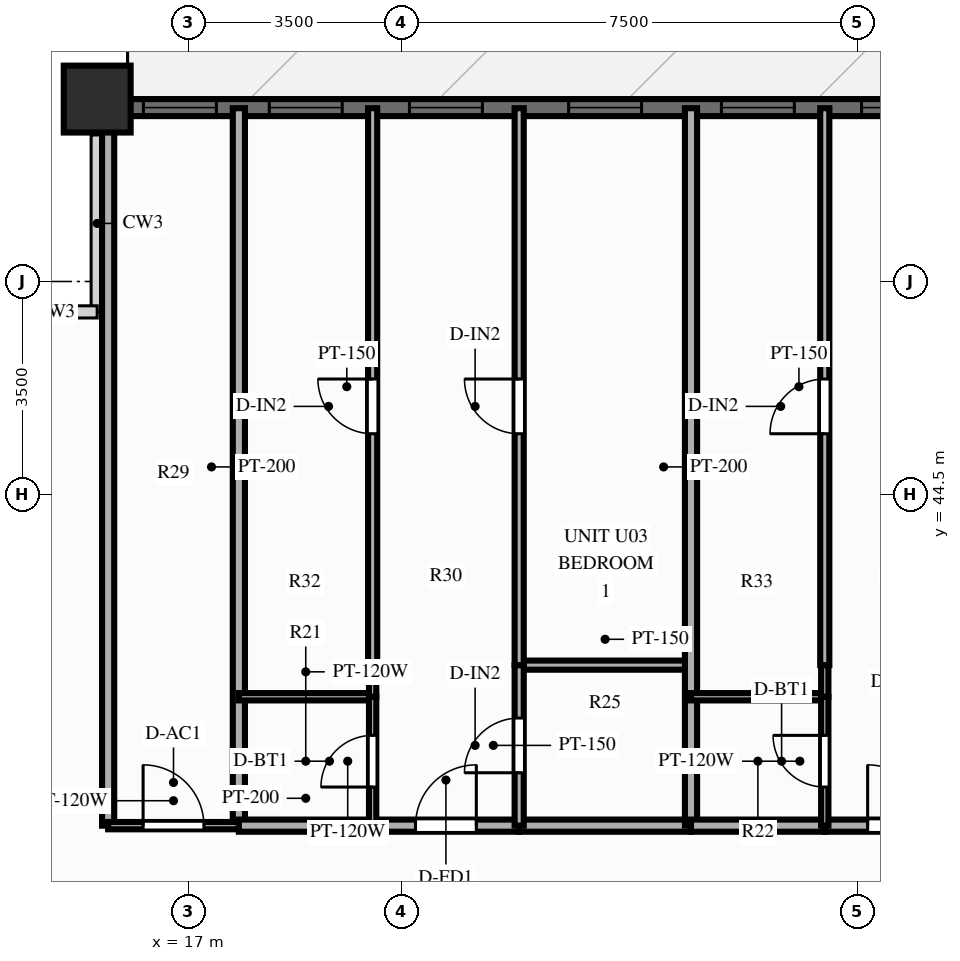
"""IFC4 building model, lengths in metres.
Left out: names, types, materials, properties, quantities, classifications, styles, units other than length and angle.
Written with IfcOpenShell. Run it as: python <this file> out.ifc"""

import sys

from ifc_helpers import new_model, si_unit, direction, frame, frame_2d, origin, origin_2d, place, context, subcontext, project, spatial, rectangle, extrude, source, transform, mapped, element, fill, save


model = new_model("IFC4")
c1 = context("Model", 3, precision=1e-05, world=origin(), true_north=direction((0.0, 1.0)))
c2 = subcontext(c1, "Body", "Model", "MODEL_VIEW")
j1 = project(units=[si_unit("LENGTHUNIT", "METRE"), si_unit("PLANEANGLEUNIT", "RADIAN")], contexts=[c1])
p1 = place(None, origin())
s1 = spatial("IfcSite", under=j1, at=p1, CompositionType="ELEMENT")
p2 = place(p1, origin())
s2 = spatial("IfcBuilding", under=s1, at=p2, CompositionType="ELEMENT")
p3 = place(p2, frame((0.0, 0.0, 52.4)))
s3 = spatial("IfcBuildingStorey", under=s2, at=p3, CompositionType="ELEMENT", Elevation=52.4)
m1 = source(origin(), c2, "Body", "SweptSolid", [
    extrude(rectangle(XDim=1.1, YDim=1.1, at=origin_2d()), origin(), (0.0, 0.0, 1.0), 3.0),
])
p4 = place(p3, frame((15.5, 51.0, 0.0), z_axis=(0.0, 0.0, 1.0), x_axis=(1.0, 0.0, 0.0)))
e1 = element("IfcColumn", 1, at=p4, inside=s3, PredefinedType="COLUMN", context=c2, shape_type="MappedRepresentation", body=[
    mapped(m1, transform((0.0, 0.0, 0.0), scale=1.0)),
])
p5 = place(p3, frame((15.5, 50.86, 0.0), z_axis=(0.0, 0.0, 1.0), x_axis=(1.0, 0.0, 0.0)))
e2 = element("IfcWall", 2, at=p5, inside=s3, PredefinedType="SOLIDWALL", context=c2, shape_type="SweptSolid", body=[
    extrude(rectangle(XDim=45.0, YDim=0.28, at=frame_2d((22.5, 0.0))), origin(), (0.0, 0.0, 1.0), 2.28),
])
p6 = place(p5, frame((0.76, 0.0, 0.25)))
e3 = element("IfcOpeningElement", 3, at=p6, cuts=e2, PredefinedType="OPENING", context=c2, shape_type="SweptSolid", body=[
    extrude(rectangle(XDim=1.2, YDim=1.5, at=frame_2d((0.6, 0.75))), frame((0.0, 0.152, 0.0), z_axis=(0.0, -1.0, 0.0), x_axis=(1.0, 0.0, 0.0)), (0.0, 0.0, 1.0), 0.304),
])
p7 = place(p5, frame((2.83, 0.0, 0.25)))
e4 = element("IfcOpeningElement", 4, at=p7, cuts=e2, PredefinedType="OPENING", context=c2, shape_type="SweptSolid", body=[
    extrude(rectangle(XDim=1.2, YDim=1.5, at=frame_2d((0.6, 0.75))), frame((0.0, 0.152, 0.0), z_axis=(0.0, -1.0, 0.0), x_axis=(1.0, 0.0, 0.0)), (0.0, 0.0, 1.0), 0.304),
])
p8 = place(p5, frame((5.135, 0.0, 0.25)))
e5 = element("IfcOpeningElement", 5, at=p8, cuts=e2, PredefinedType="OPENING", context=c2, shape_type="SweptSolid", body=[
    extrude(rectangle(XDim=1.2, YDim=1.5, at=frame_2d((0.6, 0.75))), frame((0.0, 0.152, 0.0), z_axis=(0.0, -1.0, 0.0), x_axis=(1.0, 0.0, 0.0)), (0.0, 0.0, 1.0), 0.304),
])
p9 = place(p5, frame((7.753, 0.0, 0.25)))
e6 = element("IfcOpeningElement", 6, at=p9, cuts=e2, PredefinedType="OPENING", context=c2, shape_type="SweptSolid", body=[
    extrude(rectangle(XDim=1.2, YDim=1.5, at=frame_2d((0.6, 0.75))), frame((0.0, 0.152, 0.0), z_axis=(0.0, -1.0, 0.0), x_axis=(1.0, 0.0, 0.0)), (0.0, 0.0, 1.0), 0.304),
])
p10 = place(p5, frame((10.266, 0.0, 0.25)))
e7 = element("IfcOpeningElement", 7, at=p10, cuts=e2, PredefinedType="OPENING", context=c2, shape_type="SweptSolid", body=[
    extrude(rectangle(XDim=1.2, YDim=1.5, at=frame_2d((0.6, 0.75))), frame((0.0, 0.152, 0.0), z_axis=(0.0, -1.0, 0.0), x_axis=(1.0, 0.0, 0.0)), (0.0, 0.0, 1.0), 0.304),
])
p11 = place(p5, frame((12.571, 0.0, 0.25)))
e8 = element("IfcOpeningElement", 8, at=p11, cuts=e2, PredefinedType="OPENING", context=c2, shape_type="SweptSolid", body=[
    extrude(rectangle(XDim=1.2, YDim=1.5, at=frame_2d((0.6, 0.75))), frame((0.0, 0.152, 0.0), z_axis=(0.0, -1.0, 0.0), x_axis=(1.0, 0.0, 0.0)), (0.0, 0.0, 1.0), 0.304),
])
p12 = place(p5, frame((14.643, 0.0, 0.25)))
e9 = element("IfcOpeningElement", 9, at=p12, cuts=e2, PredefinedType="OPENING", context=c2, shape_type="SweptSolid", body=[
    extrude(rectangle(XDim=0.7, YDim=1.5, at=frame_2d((0.35, 0.75))), frame((0.0, 0.152, 0.0), z_axis=(0.0, -1.0, 0.0), x_axis=(1.0, 0.0, 0.0)), (0.0, 0.0, 1.0), 0.304),
])
p13 = place(p5, frame((17.977, 0.0, 0.25)))
e10 = element("IfcOpeningElement", 10, at=p13, cuts=e2, PredefinedType="OPENING", context=c2, shape_type="SweptSolid", body=[
    extrude(rectangle(XDim=1.2, YDim=1.5, at=frame_2d((0.6, 0.75))), frame((0.0, 0.152, 0.0), z_axis=(0.0, -1.0, 0.0), x_axis=(1.0, 0.0, 0.0)), (0.0, 0.0, 1.0), 0.304),
])
p14 = place(p5, frame((23.263, 0.0, 0.0)))
e11 = element("IfcOpeningElement", 11, at=p14, cuts=e2, PredefinedType="OPENING", context=c2, shape_type="SweptSolid", body=[
    extrude(rectangle(XDim=1.1, YDim=2.15, at=frame_2d((0.55, 1.075))), frame((0.0, 0.152, 0.0), z_axis=(0.0, -1.0, 0.0), x_axis=(1.0, 0.0, 0.0)), (0.0, 0.0, 1.0), 0.304),
])
p15 = place(p5, frame((29.832, 0.0, 0.25)))
e12 = element("IfcOpeningElement", 12, at=p15, cuts=e2, PredefinedType="OPENING", context=c2, shape_type="SweptSolid", body=[
    extrude(rectangle(XDim=0.95, YDim=1.5, at=frame_2d((0.475, 0.75))), frame((0.0, 0.152, 0.0), z_axis=(0.0, -1.0, 0.0), x_axis=(1.0, 0.0, 0.0)), (0.0, 0.0, 1.0), 0.304),
])
p16 = place(p5, frame((31.998, 0.0, 0.25)))
e13 = element("IfcOpeningElement", 13, at=p16, cuts=e2, PredefinedType="OPENING", context=c2, shape_type="SweptSolid", body=[
    extrude(rectangle(XDim=1.2, YDim=1.5, at=frame_2d((0.6, 0.75))), frame((0.0, 0.152, 0.0), z_axis=(0.0, -1.0, 0.0), x_axis=(1.0, 0.0, 0.0)), (0.0, 0.0, 1.0), 0.304),
])
p17 = place(p5, frame((37.023, 0.0, 0.25)))
e14 = element("IfcOpeningElement", 14, at=p17, cuts=e2, PredefinedType="OPENING", context=c2, shape_type="SweptSolid", body=[
    extrude(rectangle(XDim=1.2, YDim=1.5, at=frame_2d((0.6, 0.75))), frame((0.0, 0.152, 0.0), z_axis=(0.0, -1.0, 0.0), x_axis=(1.0, 0.0, 0.0)), (0.0, 0.0, 1.0), 0.304),
])
p18 = place(p5, frame((42.341, 0.0, 0.25)))
e15 = element("IfcOpeningElement", 15, at=p18, cuts=e2, PredefinedType="OPENING", context=c2, shape_type="SweptSolid", body=[
    extrude(rectangle(XDim=1.2, YDim=1.5, at=frame_2d((0.6, 0.75))), frame((0.0, 0.152, 0.0), z_axis=(0.0, -1.0, 0.0), x_axis=(1.0, 0.0, 0.0)), (0.0, 0.0, 1.0), 0.304),
])
for number, where, z_axis, x_axis in (
    (16, (15.68, 39.05, 0.0), (0.0, 0.0, 1.0), (0.0, 1.0, 0.0)),
    (17, (17.83, 39.05, 0.0), (0.0, 0.0, 1.0), (0.0, 1.0, 0.0)),
):
    element("IfcWall", number, at=place(p3, frame(where, z_axis=z_axis, x_axis=x_axis)), inside=s3, PredefinedType="PARTITIONING", context=c2, shape_type="SweptSolid", body=[
        extrude(rectangle(XDim=11.8, YDim=0.2, at=frame_2d((5.9, 0.0))), origin(), (0.0, 0.0, 1.0), 2.79),
    ])
p19 = place(p3, frame((15.68, 39.05, 0.0), z_axis=(0.0, 0.0, 1.0), x_axis=(1.0, 0.0, 0.0)))
e18 = element("IfcWall", 18, at=p19, inside=s3, PredefinedType="PARTITIONING", context=c2, shape_type="SweptSolid", body=[
    extrude(rectangle(XDim=2.15, YDim=0.12, at=frame_2d((1.075, 0.0))), origin(), (0.0, 0.0, 1.0), 2.79),
])
p20 = place(p19, frame((0.575, 0.0, 0.0)))
e19 = element("IfcOpeningElement", 19, at=p20, cuts=e18, PredefinedType="OPENING", context=c2, shape_type="SweptSolid", body=[
    extrude(rectangle(XDim=1.0, YDim=2.1, at=frame_2d((0.5, 1.05))), frame((0.0, 0.072, 0.0), z_axis=(0.0, -1.0, 0.0), x_axis=(1.0, 0.0, 0.0)), (0.0, 0.0, 1.0), 0.144),
])
p21 = place(p3, frame((17.83, 39.05, 0.0), z_axis=(0.0, 0.0, 1.0), x_axis=(1.0, 0.0, 0.0)))
e20 = element("IfcWall", 20, at=p21, inside=s3, PredefinedType="PARTITIONING", context=c2, shape_type="SweptSolid", body=[
    extrude(rectangle(XDim=2.2, YDim=0.2, at=frame_2d((1.1, 0.0))), origin(), (0.0, 0.0, 1.0), 2.79),
])
p22 = place(p3, frame((20.03, 39.05, 0.0), z_axis=(0.0, 0.0, 1.0), x_axis=(1.0, 0.0, 0.0)))
e21 = element("IfcWall", 21, at=p22, inside=s3, PredefinedType="PARTITIONING", context=c2, shape_type="SweptSolid", body=[
    extrude(rectangle(XDim=2.41, YDim=0.2, at=frame_2d((1.205, 0.0))), origin(), (0.0, 0.0, 1.0), 2.79),
])
p23 = place(p22, frame((0.705, 0.0, 0.0)))
e22 = element("IfcOpeningElement", 22, at=p23, cuts=e21, PredefinedType="OPENING", context=c2, shape_type="SweptSolid", body=[
    extrude(rectangle(XDim=1.0, YDim=2.15, at=frame_2d((0.5, 1.075))), frame((0.0, 0.112, 0.0), z_axis=(0.0, -1.0, 0.0), x_axis=(1.0, 0.0, 0.0)), (0.0, 0.0, 1.0), 0.224),
])
p24 = place(p3, frame((22.44, 39.05, 0.0), z_axis=(0.0, 0.0, 1.0), x_axis=(1.0, 0.0, 0.0)))
e23 = element("IfcWall", 23, at=p24, inside=s3, PredefinedType="PARTITIONING", context=c2, shape_type="SweptSolid", body=[
    extrude(rectangle(XDim=2.826, YDim=0.2, at=frame_2d((1.413, 0.0))), origin(), (0.0, 0.0, 1.0), 2.79),
])
p25 = place(p3, frame((17.83, 41.17, 0.0), z_axis=(0.0, 0.0, 1.0), x_axis=(1.0, 0.0, 0.0)))
e24 = element("IfcWall", 24, at=p25, inside=s3, PredefinedType="PARTITIONING", context=c2, shape_type="SweptSolid", body=[
    extrude(rectangle(XDim=2.2, YDim=0.12, at=frame_2d((1.1, 0.0))), origin(), (0.0, 0.0, 1.0), 2.79),
])
p26 = place(p3, frame((22.44, 41.69, 0.0), z_axis=(0.0, 0.0, 1.0), x_axis=(1.0, 0.0, 0.0)))
e25 = element("IfcWall", 25, at=p26, inside=s3, PredefinedType="PARTITIONING", context=c2, shape_type="SweptSolid", body=[
    extrude(rectangle(XDim=2.826, YDim=0.15, at=frame_2d((1.413, 0.0))), origin(), (0.0, 0.0, 1.0), 2.79),
])
p27 = place(p3, frame((20.03, 39.05, 0.0), z_axis=(0.0, 0.0, 1.0), x_axis=(0.0, 1.0, 0.0)))
e26 = element("IfcWall", 26, at=p27, inside=s3, PredefinedType="PARTITIONING", context=c2, shape_type="SweptSolid", body=[
    extrude(rectangle(XDim=2.12, YDim=0.12, at=frame_2d((1.06, 0.0))), origin(), (0.0, 0.0, 1.0), 2.79),
])
p28 = place(p27, frame((0.635, 0.0, 0.0)))
e27 = element("IfcOpeningElement", 27, at=p28, cuts=e26, PredefinedType="OPENING", context=c2, shape_type="SweptSolid", body=[
    extrude(rectangle(XDim=0.85, YDim=2.05, at=frame_2d((0.425, 1.025))), frame((0.0, 0.072, 0.0), z_axis=(0.0, -1.0, 0.0), x_axis=(1.0, 0.0, 0.0)), (0.0, 0.0, 1.0), 0.144),
])
p29 = place(p3, frame((20.03, 41.17, 0.0), z_axis=(0.0, 0.0, 1.0), x_axis=(0.0, 1.0, 0.0)))
e28 = element("IfcWall", 28, at=p29, inside=s3, PredefinedType="PARTITIONING", context=c2, shape_type="SweptSolid", body=[
    extrude(rectangle(XDim=0.52, YDim=0.12, at=frame_2d((0.26, 0.0))), origin(), (0.0, 0.0, 1.0), 2.79),
])
p30 = place(p3, frame((20.03, 41.69, 0.0), z_axis=(0.0, 0.0, 1.0), x_axis=(0.0, 1.0, 0.0)))
e29 = element("IfcWall", 29, at=p30, inside=s3, PredefinedType="PARTITIONING", context=c2, shape_type="SweptSolid", body=[
    extrude(rectangle(XDim=9.16, YDim=0.15, at=frame_2d((4.58, 0.0))), origin(), (0.0, 0.0, 1.0), 2.79),
])
p31 = place(p30, frame((3.806, 0.0, 0.0)))
e30 = element("IfcOpeningElement", 30, at=p31, cuts=e29, PredefinedType="OPENING", context=c2, shape_type="SweptSolid", body=[
    extrude(rectangle(XDim=0.9, YDim=2.1, at=frame_2d((0.45, 1.05))), frame((0.0, 0.087, 0.0), z_axis=(0.0, -1.0, 0.0), x_axis=(1.0, 0.0, 0.0)), (0.0, 0.0, 1.0), 0.174),
])
p32 = place(p3, frame((22.44, 39.05, 0.0), z_axis=(0.0, 0.0, 1.0), x_axis=(0.0, 1.0, 0.0)))
e31 = element("IfcWall", 31, at=p32, inside=s3, PredefinedType="PARTITIONING", context=c2, shape_type="SweptSolid", body=[
    extrude(rectangle(XDim=2.64, YDim=0.15, at=frame_2d((1.32, 0.0))), origin(), (0.0, 0.0, 1.0), 2.79),
])
p33 = place(p32, frame((0.87, 0.0, 0.0)))
e32 = element("IfcOpeningElement", 32, at=p33, cuts=e31, PredefinedType="OPENING", context=c2, shape_type="SweptSolid", body=[
    extrude(rectangle(XDim=0.9, YDim=2.1, at=frame_2d((0.45, 1.05))), frame((0.0, 0.087, 0.0), z_axis=(0.0, -1.0, 0.0), x_axis=(1.0, 0.0, 0.0)), (0.0, 0.0, 1.0), 0.174),
])
p34 = place(p3, frame((22.44, 41.69, 0.0), z_axis=(0.0, 0.0, 1.0), x_axis=(0.0, 1.0, 0.0)))
e33 = element("IfcWall", 33, at=p34, inside=s3, PredefinedType="PARTITIONING", context=c2, shape_type="SweptSolid", body=[
    extrude(rectangle(XDim=9.16, YDim=0.15, at=frame_2d((4.58, 0.0))), origin(), (0.0, 0.0, 1.0), 2.79),
])
p35 = place(p34, frame((3.806, 0.0, 0.0)))
e34 = element("IfcOpeningElement", 34, at=p35, cuts=e33, PredefinedType="OPENING", context=c2, shape_type="SweptSolid", body=[
    extrude(rectangle(XDim=0.9, YDim=2.1, at=frame_2d((0.45, 1.05))), frame((0.0, 0.087, 0.0), z_axis=(0.0, -1.0, 0.0), x_axis=(1.0, 0.0, 0.0)), (0.0, 0.0, 1.0), 0.174),
])
p36 = place(p3, frame((25.266, 39.05, 0.0), z_axis=(0.0, 0.0, 1.0), x_axis=(0.0, 1.0, 0.0)))
e35 = element("IfcWall", 35, at=p36, inside=s3, PredefinedType="PARTITIONING", context=c2, shape_type="SweptSolid", body=[
    extrude(rectangle(XDim=11.8, YDim=0.2, at=frame_2d((5.9, 0.0))), origin(), (0.0, 0.0, 1.0), 2.79),
])
p37 = place(p3, frame((25.266, 39.05, 0.0), z_axis=(0.0, 0.0, 1.0), x_axis=(1.0, 0.0, 0.0)))
e36 = element("IfcWall", 36, at=p37, inside=s3, PredefinedType="PARTITIONING", context=c2, shape_type="SweptSolid", body=[
    extrude(rectangle(XDim=2.2, YDim=0.2, at=frame_2d((1.1, 0.0))), origin(), (0.0, 0.0, 1.0), 2.79),
])
p38 = place(p3, frame((27.466, 39.05, 0.0), z_axis=(0.0, 0.0, 1.0), x_axis=(1.0, 0.0, 0.0)))
e37 = element("IfcWall", 37, at=p38, inside=s3, PredefinedType="PARTITIONING", context=c2, shape_type="SweptSolid", body=[
    extrude(rectangle(XDim=2.41, YDim=0.2, at=frame_2d((1.205, 0.0))), origin(), (0.0, 0.0, 1.0), 2.79),
])
p39 = place(p38, frame((0.705, 0.0, 0.0)))
e38 = element("IfcOpeningElement", 38, at=p39, cuts=e37, PredefinedType="OPENING", context=c2, shape_type="SweptSolid", body=[
    extrude(rectangle(XDim=1.0, YDim=2.15, at=frame_2d((0.5, 1.075))), frame((0.0, 0.112, 0.0), z_axis=(0.0, -1.0, 0.0), x_axis=(1.0, 0.0, 0.0)), (0.0, 0.0, 1.0), 0.224),
])
p40 = place(p3, frame((25.266, 41.17, 0.0), z_axis=(0.0, 0.0, 1.0), x_axis=(1.0, 0.0, 0.0)))
e39 = element("IfcWall", 39, at=p40, inside=s3, PredefinedType="PARTITIONING", context=c2, shape_type="SweptSolid", body=[
    extrude(rectangle(XDim=2.2, YDim=0.12, at=frame_2d((1.1, 0.0))), origin(), (0.0, 0.0, 1.0), 2.79),
])
p41 = place(p3, frame((27.466, 39.05, 0.0), z_axis=(0.0, 0.0, 1.0), x_axis=(0.0, 1.0, 0.0)))
e40 = element("IfcWall", 40, at=p41, inside=s3, PredefinedType="PARTITIONING", context=c2, shape_type="SweptSolid", body=[
    extrude(rectangle(XDim=2.12, YDim=0.12, at=frame_2d((1.06, 0.0))), origin(), (0.0, 0.0, 1.0), 2.79),
])
p42 = place(p41, frame((0.635, 0.0, 0.0)))
e41 = element("IfcOpeningElement", 41, at=p42, cuts=e40, PredefinedType="OPENING", context=c2, shape_type="SweptSolid", body=[
    extrude(rectangle(XDim=0.85, YDim=2.05, at=frame_2d((0.425, 1.025))), frame((0.0, 0.072, 0.0), z_axis=(0.0, -1.0, 0.0), x_axis=(1.0, 0.0, 0.0)), (0.0, 0.0, 1.0), 0.144),
])
p43 = place(p3, frame((27.466, 41.17, 0.0), z_axis=(0.0, 0.0, 1.0), x_axis=(0.0, 1.0, 0.0)))
e42 = element("IfcWall", 42, at=p43, inside=s3, PredefinedType="PARTITIONING", context=c2, shape_type="SweptSolid", body=[
    extrude(rectangle(XDim=0.52, YDim=0.12, at=frame_2d((0.26, 0.0))), origin(), (0.0, 0.0, 1.0), 2.79),
])
p44 = place(p3, frame((27.466, 41.69, 0.0), z_axis=(0.0, 0.0, 1.0), x_axis=(0.0, 1.0, 0.0)))
e43 = element("IfcWall", 43, at=p44, inside=s3, PredefinedType="PARTITIONING", context=c2, shape_type="SweptSolid", body=[
    extrude(rectangle(XDim=9.16, YDim=0.15, at=frame_2d((4.58, 0.0))), origin(), (0.0, 0.0, 1.0), 2.79),
])
p45 = place(p44, frame((3.806, 0.0, 0.0)))
e44 = element("IfcOpeningElement", 44, at=p45, cuts=e43, PredefinedType="OPENING", context=c2, shape_type="SweptSolid", body=[
    extrude(rectangle(XDim=0.9, YDim=2.1, at=frame_2d((0.45, 1.05))), frame((0.0, 0.087, 0.0), z_axis=(0.0, -1.0, 0.0), x_axis=(1.0, 0.0, 0.0)), (0.0, 0.0, 1.0), 0.174),
])
m2 = source(origin(), c2, "Body", "SweptSolid", [
    extrude(rectangle(XDim=1.2, YDim=1.5, at=frame_2d((0.6, 0.75))), frame((0.0, 0.03, 0.0), z_axis=(0.0, -1.0, 0.0), x_axis=(1.0, 0.0, 0.0)), (0.0, 0.0, 1.0), 0.06),
])
p46 = place(p6, origin())
e45 = element("IfcWindow", 45, at=p46, inside=s3, PartitioningType="SINGLE_PANEL", PredefinedType="WINDOW", context=c2, shape_type="MappedRepresentation", body=[
    mapped(m2, transform((0.0, 0.0, 0.0), scale=1.0)),
])
fill(e3, e45)
p47 = place(p7, origin())
e46 = element("IfcWindow", 46, at=p47, inside=s3, PartitioningType="SINGLE_PANEL", PredefinedType="WINDOW", context=c2, shape_type="MappedRepresentation", body=[
    mapped(m2, transform((0.0, 0.0, 0.0), scale=1.0)),
])
fill(e4, e46)
p48 = place(p8, origin())
e47 = element("IfcWindow", 47, at=p48, inside=s3, PartitioningType="SINGLE_PANEL", PredefinedType="WINDOW", context=c2, shape_type="MappedRepresentation", body=[
    mapped(m2, transform((0.0, 0.0, 0.0), scale=1.0)),
])
fill(e5, e47)
p49 = place(p9, origin())
e48 = element("IfcWindow", 48, at=p49, inside=s3, PartitioningType="SINGLE_PANEL", PredefinedType="WINDOW", context=c2, shape_type="MappedRepresentation", body=[
    mapped(m2, transform((0.0, 0.0, 0.0), scale=1.0)),
])
fill(e6, e48)
p50 = place(p10, origin())
e49 = element("IfcWindow", 49, at=p50, inside=s3, PartitioningType="SINGLE_PANEL", PredefinedType="WINDOW", context=c2, shape_type="MappedRepresentation", body=[
    mapped(m2, transform((0.0, 0.0, 0.0), scale=1.0)),
])
fill(e7, e49)
p51 = place(p11, origin())
e50 = element("IfcWindow", 50, at=p51, inside=s3, PartitioningType="SINGLE_PANEL", PredefinedType="WINDOW", context=c2, shape_type="MappedRepresentation", body=[
    mapped(m2, transform((0.0, 0.0, 0.0), scale=1.0)),
])
fill(e8, e50)
m3 = source(origin(), c2, "Body", "SweptSolid", [
    extrude(rectangle(XDim=1.0, YDim=2.1, at=frame_2d((0.5, 1.05))), frame((0.0, 0.025, 0.0), z_axis=(0.0, -1.0, 0.0), x_axis=(1.0, 0.0, 0.0)), (0.0, 0.0, 1.0), 0.05),
])
p52 = place(p20, origin())
e51 = element("IfcDoor", 51, at=p52, inside=s3, OperationType="SINGLE_SWING_LEFT", PredefinedType="DOOR", context=c2, shape_type="MappedRepresentation", body=[
    mapped(m3, transform((0.0, 0.0, 0.0), scale=1.0)),
])
fill(e19, e51)
m4 = source(origin(), c2, "Body", "SweptSolid", [
    extrude(rectangle(XDim=1.0, YDim=2.15, at=frame_2d((0.5, 1.075))), frame((0.0, 0.025, 0.0), z_axis=(0.0, -1.0, 0.0), x_axis=(1.0, 0.0, 0.0)), (0.0, 0.0, 1.0), 0.05),
])
p53 = place(p23, origin())
e52 = element("IfcDoor", 52, at=p53, inside=s3, OperationType="SINGLE_SWING_RIGHT", PredefinedType="DOOR", context=c2, shape_type="MappedRepresentation", body=[
    mapped(m4, transform((0.0, 0.0, 0.0), scale=1.0)),
])
fill(e22, e52)
m5 = source(origin(), c2, "Body", "SweptSolid", [
    extrude(rectangle(XDim=0.85, YDim=2.05, at=frame_2d((0.425, 1.025))), frame((0.0, 0.025, 0.0), z_axis=(0.0, -1.0, 0.0), x_axis=(1.0, 0.0, 0.0)), (0.0, 0.0, 1.0), 0.05),
])
p54 = place(p28, origin())
e53 = element("IfcDoor", 53, at=p54, inside=s3, OperationType="SINGLE_SWING_LEFT", PredefinedType="DOOR", context=c2, shape_type="MappedRepresentation", body=[
    mapped(m5, transform((0.0, 0.0, 0.0), scale=1.0)),
])
fill(e27, e53)
m6 = source(origin(), c2, "Body", "SweptSolid", [
    extrude(rectangle(XDim=0.9, YDim=2.1, at=frame_2d((0.45, 1.05))), frame((0.0, 0.025, 0.0), z_axis=(0.0, -1.0, 0.0), x_axis=(1.0, 0.0, 0.0)), (0.0, 0.0, 1.0), 0.05),
])
p55 = place(p31, origin())
e54 = element("IfcDoor", 54, at=p55, inside=s3, OperationType="SINGLE_SWING_RIGHT", PredefinedType="DOOR", context=c2, shape_type="MappedRepresentation", body=[
    mapped(m6, transform((0.0, 0.0, 0.0), scale=1.0)),
])
fill(e30, e54)
p56 = place(p33, origin())
e55 = element("IfcDoor", 55, at=p56, inside=s3, OperationType="SINGLE_SWING_LEFT", PredefinedType="DOOR", context=c2, shape_type="MappedRepresentation", body=[
    mapped(m6, transform((0.0, 0.0, 0.0), scale=1.0)),
])
fill(e32, e55)
p57 = place(p35, origin())
e56 = element("IfcDoor", 56, at=p57, inside=s3, OperationType="SINGLE_SWING_RIGHT", PredefinedType="DOOR", context=c2, shape_type="MappedRepresentation", body=[
    mapped(m6, transform((0.0, 0.0, 0.0), scale=1.0)),
])
fill(e34, e56)
p58 = place(p39, origin())
e57 = element("IfcDoor", 57, at=p58, inside=s3, OperationType="SINGLE_SWING_LEFT", PredefinedType="DOOR", context=c2, shape_type="MappedRepresentation", body=[
    mapped(m4, transform((0.0, 0.0, 0.0), scale=1.0)),
])
fill(e38, e57)
p59 = place(p42, origin())
e58 = element("IfcDoor", 58, at=p59, inside=s3, OperationType="SINGLE_SWING_RIGHT", PredefinedType="DOOR", context=c2, shape_type="MappedRepresentation", body=[
    mapped(m5, transform((0.0, 0.0, 0.0), scale=1.0)),
])
fill(e41, e58)
p60 = place(p45, origin())
e59 = element("IfcDoor", 59, at=p60, inside=s3, OperationType="SINGLE_SWING_LEFT", PredefinedType="DOOR", context=c2, shape_type="MappedRepresentation", body=[
    mapped(m6, transform((0.0, 0.0, 0.0), scale=1.0)),
])
fill(e44, e59)
save(model, sys.argv[1])
